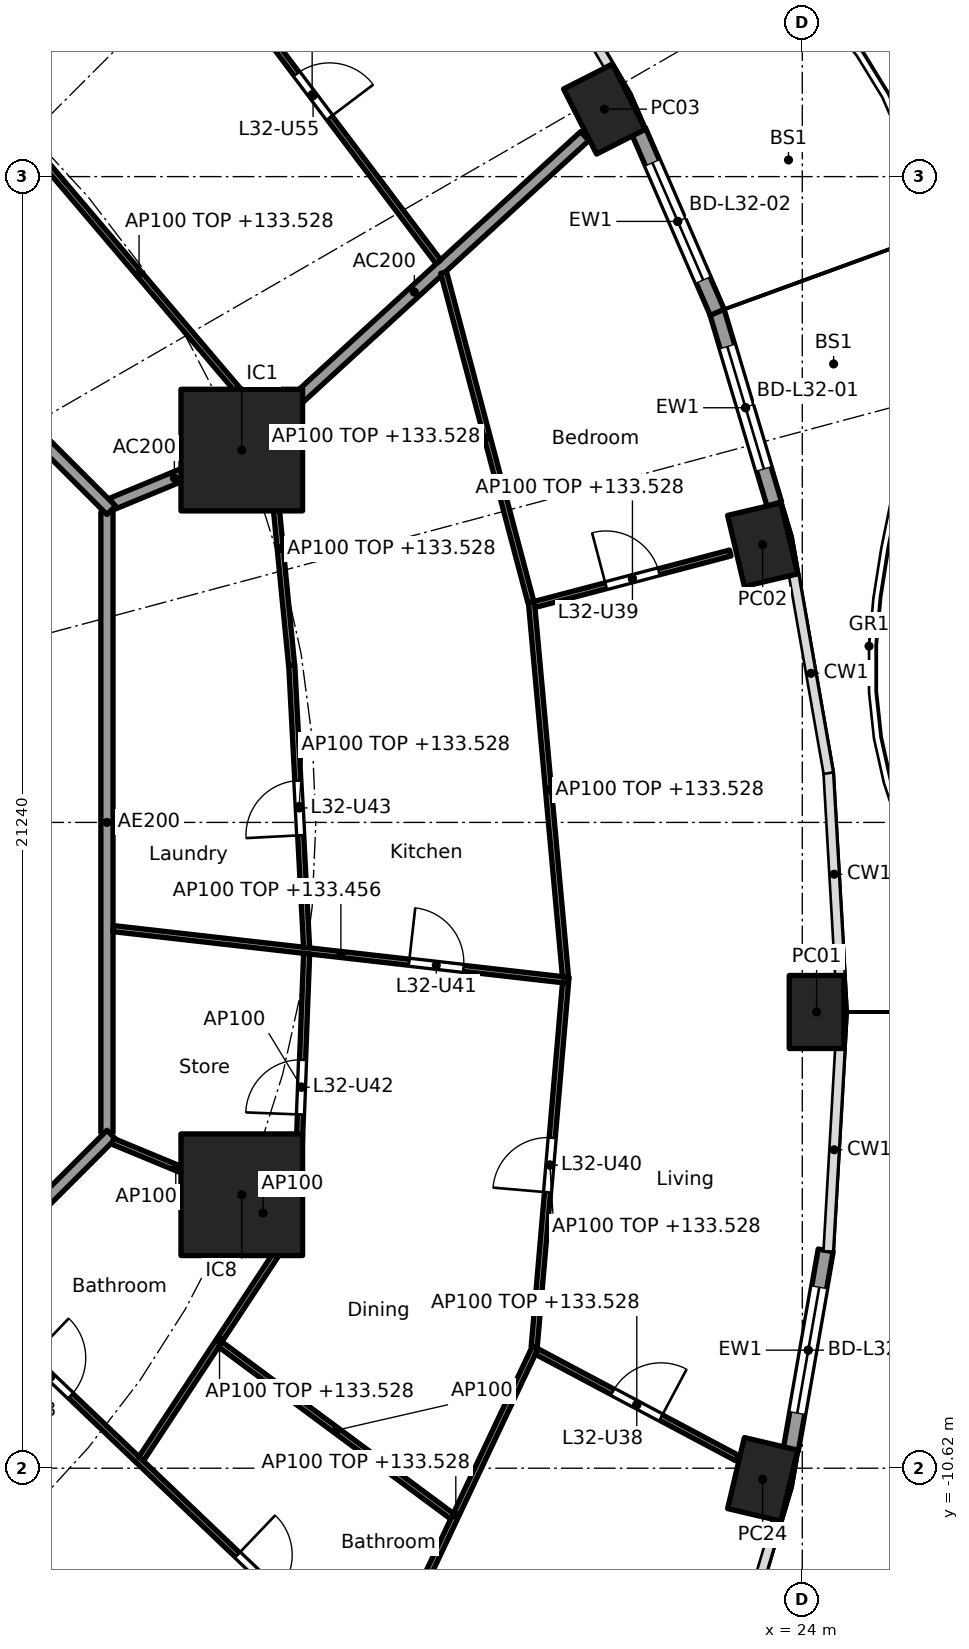
"""IFC4 building model, lengths in metres.
Left out: names, types, materials, properties, quantities, classifications, styles, units other than length and angle.
Written with IfcOpenShell. Run it as: python <this file> out.ifc"""

import sys

from ifc_helpers import new_model, si_unit, direction, frame, frame_2d, origin, origin_2d, place, context, subcontext, project, spatial, rectangle, hollow_rectangle, extrude, element, fill, save


model = new_model("IFC4")
c1 = context("Model", 3, precision=1e-05, world=origin(), true_north=direction((0.0, 1.0)))
c2 = subcontext(c1, "Body", "Model", "MODEL_VIEW")
j1 = project(units=[si_unit("LENGTHUNIT", "METRE"), si_unit("PLANEANGLEUNIT", "RADIAN")], contexts=[c1])
p1 = place(None, origin())
s1 = spatial("IfcSite", under=j1, at=p1, CompositionType="ELEMENT")
p2 = place(p1, origin())
s2 = spatial("IfcBuilding", under=s1, at=p2, CompositionType="ELEMENT")
p3 = place(p2, frame((0.0, 0.0, 130.7)))
s3 = spatial("IfcBuildingStorey", under=s2, at=p3, CompositionType="ELEMENT", Elevation=130.7)
for number, where, z_axis, x_axis in (
    (1, (24.235, -3.118, 0.0), (0.0, 0.0, 1.0), (0.0, 1.0, 0.0)),
    (2, (23.348, 4.568, 0.0), (0.0, 0.0, 1.0), (-0.229, 0.973, 0.0)),
    (3, (20.747, 11.73, 0.0), (0.0, 0.0, 1.0), (-0.452, 0.892, 0.0)),
    (4, (23.348, -10.803, 0.0), (0.0, 0.0, 1.0), (0.229, 0.973, 0.0)),
):
    element("IfcColumn", number, at=place(p3, frame(where, z_axis=z_axis, x_axis=x_axis)), inside=s3, PredefinedType="COLUMN", context=c2, shape_type="SweptSolid", body=[
        extrude(hollow_rectangle(XDim=1.2, YDim=0.9, WallThickness=0.04, at=origin_2d()), origin(), (0.0, 0.0, 1.0), 3.7),
    ])
for number, where, z_axis, x_axis in (
    (5, (14.782, 6.123, 0.0), (0.0, 0.0, 1.0), (1.0, 0.0, 0.0)),
    (6, (14.782, -6.123, 0.0), (0.0, 0.0, 1.0), (1.0, 0.0, 0.0)),
):
    element("IfcColumn", number, at=place(p3, frame(where, z_axis=z_axis, x_axis=x_axis)), inside=s3, PredefinedType="COLUMN", context=c2, shape_type="SweptSolid", body=[
        extrude(rectangle(XDim=2.0, YDim=2.0, at=origin_2d()), origin(), (0.0, 0.0, 1.0), 3.7),
    ])
p4 = place(p3, frame((22.595, 8.402, 0.0), z_axis=(0.0, 0.0, 1.0), x_axis=(0.285842038783, -0.958276749621, 0.0)))
e7 = element("IfcWall", 7, at=p4, inside=s3, PredefinedType="SOLIDWALL", context=c2, shape_type="SweptSolid", body=[
    extrude(rectangle(XDim=3.303, YDim=0.25, at=frame_2d((1.651, 0.0))), origin(), (0.0, 0.0, 1.0), 3.44),
])
p5 = place(p4, frame((0.602, 0.0, 0.0)))
e8 = element("IfcOpeningElement", 8, at=p5, cuts=e7, PredefinedType="OPENING", context=c2, shape_type="SweptSolid", body=[
    extrude(rectangle(XDim=2.1, YDim=2.4, at=frame_2d((1.05, 1.2))), frame((0.0, 0.135, 0.0), z_axis=(0.0, -1.0, 0.0), x_axis=(1.0, 0.0, 0.0)), (0.0, 0.0, 1.0), 0.27),
])
p6 = place(p3, frame((21.304, 11.38, 0.0), z_axis=(0.0, 0.0, 1.0), x_axis=(0.397575919276, -0.917569282622, 0.0)))
e9 = element("IfcWall", 9, at=p6, inside=s3, PredefinedType="SOLIDWALL", context=c2, shape_type="SweptSolid", body=[
    extrude(rectangle(XDim=3.261, YDim=0.25, at=frame_2d((1.63, 0.0))), origin(), (0.0, 0.0, 1.0), 3.44),
])
p7 = place(p6, frame((0.58, 0.0, 0.0)))
e10 = element("IfcOpeningElement", 10, at=p7, cuts=e9, PredefinedType="OPENING", context=c2, shape_type="SweptSolid", body=[
    extrude(rectangle(XDim=2.1, YDim=2.4, at=frame_2d((1.05, 1.2))), frame((0.0, 0.135, 0.0), z_axis=(0.0, -1.0, 0.0), x_axis=(1.0, 0.0, 0.0)), (0.0, 0.0, 1.0), 0.27),
])
p8 = place(p3, frame((24.385, -7.037, 0.0), z_axis=(0.0, 0.0, 1.0), x_axis=(-0.172163521006, -0.985068384446, 0.0)))
e11 = element("IfcWall", 11, at=p8, inside=s3, PredefinedType="SOLIDWALL", context=c2, shape_type="SweptSolid", body=[
    extrude(rectangle(XDim=3.333, YDim=0.25, at=frame_2d((1.666, 0.0))), origin(), (0.0, 0.0, 1.0), 3.44),
])
p9 = place(p8, frame((0.616, 0.0, 0.0)))
e12 = element("IfcOpeningElement", 12, at=p9, cuts=e11, PredefinedType="OPENING", context=c2, shape_type="SweptSolid", body=[
    extrude(rectangle(XDim=2.1, YDim=2.4, at=frame_2d((1.05, 1.2))), frame((0.0, 0.135, 0.0), z_axis=(0.0, -1.0, 0.0), x_axis=(1.0, 0.0, 0.0)), (0.0, 0.0, 1.0), 0.27),
])
p10 = place(p3, frame((12.657, 5.243, 0.0), z_axis=(0.0, 0.0, 1.0), x_axis=(0.923876145736, 0.382691608661, 0.0)))
e13 = element("IfcWall", 13, at=p10, inside=s3, PredefinedType="PARTITIONING", context=c2, shape_type="SweptSolid", body=[
    extrude(rectangle(XDim=2.2, YDim=0.2, at=frame_2d((1.1, 0.0))), origin(), (0.0, 0.0, 1.0), 3.44),
])
p11 = place(p3, frame((14.819, 6.157, 0.0), z_axis=(0.0, 0.0, 1.0), x_axis=(0.737608883396, 0.675228209671, 0.0)))
e14 = element("IfcWall", 14, at=p11, inside=s3, PredefinedType="PARTITIONING", context=c2, shape_type="SweptSolid", body=[
    extrude(rectangle(XDim=7.596, YDim=0.2, at=frame_2d((3.798, 0.0))), origin(), (0.0, 0.0, 1.0), 3.44),
])
p12 = place(p3, frame((12.565, -5.104, 0.0), z_axis=(0.0, 0.0, 1.0), x_axis=(0.0, 1.0, 0.0)))
e15 = element("IfcWall", 15, at=p12, inside=s3, PredefinedType="PARTITIONING", context=c2, shape_type="SweptSolid", body=[
    extrude(rectangle(XDim=10.209, YDim=0.2, at=frame_2d((5.104, 0.0))), origin(), (0.0, 0.0, 1.0), 3.44),
])
p13 = place(p3, frame((12.635, 5.134, 0.0), z_axis=(0.0, 0.0, 1.0), x_axis=(-0.707106781187, 0.707106781187, 0.0)))
e16 = element("IfcWall", 16, at=p13, inside=s3, PredefinedType="PARTITIONING", context=c2, shape_type="SweptSolid", body=[
    extrude(rectangle(XDim=10.609, YDim=0.2, at=frame_2d((5.305, 0.0))), origin(), (0.0, 0.0, 1.0), 3.44),
])
p14 = place(p3, frame((5.275, -12.494, 0.0), z_axis=(0.0, 0.0, 1.0), x_axis=(0.707106781187, 0.707106781187, 0.0)))
e17 = element("IfcWall", 17, at=p14, inside=s3, PredefinedType="PARTITIONING", context=c2, shape_type="SweptSolid", body=[
    extrude(rectangle(XDim=10.409, YDim=0.2, at=frame_2d((5.205, 0.0))), origin(), (0.0, 0.0, 1.0), 3.44),
])
p15 = place(p14, frame((4.604, 0.0, 0.0)))
e18 = element("IfcOpeningElement", 18, at=p15, cuts=e17, PredefinedType="OPENING", context=c2, shape_type="SweptSolid", body=[
    extrude(rectangle(XDim=1.0, YDim=2.1, at=frame_2d((0.5, 1.05))), frame((0.0, 0.11, 0.0), z_axis=(0.0, -1.0, 0.0), x_axis=(1.0, 0.0, 0.0)), (0.0, 0.0, 1.0), 0.22),
])
p16 = place(p3, frame((12.664, -1.746, 0.0), z_axis=(0.0, 0.0, 1.0), x_axis=(0.993605172276, -0.112910414164, 0.0)))
e19 = element("IfcWall", 19, at=p16, inside=s3, PredefinedType="PARTITIONING", context=c2, shape_type="SweptSolid", body=[
    extrude(rectangle(XDim=7.544, YDim=0.1, at=frame_2d((3.772, 0.0))), origin(), (0.0, 0.0, 1.0), 2.756),
])
p17 = place(p16, frame((4.901, 0.0, 0.0)))
e20 = element("IfcOpeningElement", 20, at=p17, cuts=e19, PredefinedType="OPENING", context=c2, shape_type="SweptSolid", body=[
    extrude(rectangle(XDim=0.9, YDim=2.1, at=frame_2d((0.45, 1.05))), frame((0.0, 0.06, 0.0), z_axis=(0.0, -1.0, 0.0), x_axis=(1.0, 0.0, 0.0)), (0.0, 0.0, 1.0), 0.12),
])
p18 = place(p3, frame((15.848, -2.058, 0.0), z_axis=(0.0, 0.0, 1.0), x_axis=(-0.052509224895, 0.998620439056, 0.0)))
e21 = element("IfcWall", 21, at=p18, inside=s3, PredefinedType="PARTITIONING", context=c2, shape_type="SweptSolid", body=[
    extrude(rectangle(XDim=4.649, YDim=0.1, at=frame_2d((2.325, 0.0))), origin(), (0.0, 0.0, 1.0), 2.828),
])
p19 = place(p18, frame((1.85, 0.0, 0.0)))
e22 = element("IfcOpeningElement", 22, at=p19, cuts=e21, PredefinedType="OPENING", context=c2, shape_type="SweptSolid", body=[
    extrude(rectangle(XDim=0.9, YDim=2.1, at=frame_2d((0.45, 1.05))), frame((0.0, 0.06, 0.0), z_axis=(0.0, -1.0, 0.0), x_axis=(1.0, 0.0, 0.0)), (0.0, 0.0, 1.0), 0.12),
])
p20 = place(p3, frame((15.849, -2.158, 0.0), z_axis=(0.0, 0.0, 1.0), x_axis=(-0.038390448414, -0.999262815014, 0.0)))
e23 = element("IfcWall", 23, at=p20, inside=s3, PredefinedType="PARTITIONING", context=c2, shape_type="SweptSolid", body=[
    extrude(rectangle(XDim=4.394, YDim=0.1, at=frame_2d((2.197, 0.0))), origin(), (0.0, 0.0, 1.0), 3.44),
])
p21 = place(p20, frame((1.747, 0.0, 0.0)))
e24 = element("IfcOpeningElement", 24, at=p21, cuts=e23, PredefinedType="OPENING", context=c2, shape_type="SweptSolid", body=[
    extrude(rectangle(XDim=0.9, YDim=2.1, at=frame_2d((0.45, 1.05))), frame((0.0, 0.06, 0.0), z_axis=(0.0, -1.0, 0.0), x_axis=(1.0, 0.0, 0.0)), (0.0, 0.0, 1.0), 0.12),
])
p22 = place(p3, frame((20.106, -2.542, 0.0), z_axis=(0.0, 0.0, 1.0), x_axis=(-0.090567755363, 0.995890296011, 0.0)))
e25 = element("IfcWall", 25, at=p22, inside=s3, PredefinedType="PARTITIONING", context=c2, shape_type="SweptSolid", body=[
    extrude(rectangle(XDim=6.189, YDim=0.1, at=frame_2d((3.095, 0.0))), origin(), (0.0, 0.0, 1.0), 2.828),
])
p23 = place(p3, frame((20.106, -2.642, 0.0), z_axis=(0.0, 0.0, 1.0), x_axis=(-0.085672025822, -0.996323393277, 0.0)))
e26 = element("IfcWall", 26, at=p23, inside=s3, PredefinedType="PARTITIONING", context=c2, shape_type="SweptSolid", body=[
    extrude(rectangle(XDim=6.007, YDim=0.1, at=frame_2d((3.003, 0.0))), origin(), (0.0, 0.0, 1.0), 2.828),
])
p24 = place(p23, frame((2.554, 0.0, 0.0)))
e27 = element("IfcOpeningElement", 27, at=p24, cuts=e26, PredefinedType="OPENING", context=c2, shape_type="SweptSolid", body=[
    extrude(rectangle(XDim=0.9, YDim=2.1, at=frame_2d((0.45, 1.05))), frame((0.0, 0.06, 0.0), z_axis=(0.0, -1.0, 0.0), x_axis=(1.0, 0.0, 0.0)), (0.0, 0.0, 1.0), 0.12),
])
p25 = place(p3, frame((15.602, 2.584, 0.0), z_axis=(0.0, 0.0, 1.0), x_axis=(-0.097196343206, 0.995265226393, 0.0)))
e28 = element("IfcWall", 28, at=p25, inside=s3, PredefinedType="PARTITIONING", context=c2, shape_type="SweptSolid", body=[
    extrude(rectangle(XDim=3.856, YDim=0.1, at=frame_2d((1.928, 0.0))), origin(), (0.0, 0.0, 1.0), 2.828),
])
p26 = place(p3, frame((19.598, 3.584, 0.0), z_axis=(0.0, 0.0, 1.0), x_axis=(0.967108750962, 0.254363251695, 0.0)))
e29 = element("IfcWall", 29, at=p26, inside=s3, PredefinedType="PARTITIONING", context=c2, shape_type="SweptSolid", body=[
    extrude(rectangle(XDim=3.327, YDim=0.1, at=frame_2d((1.663, 0.0))), origin(), (0.0, 0.0, 1.0), 2.828),
])
p27 = place(p26, frame((1.213, 0.0, 0.0)))
e30 = element("IfcOpeningElement", 30, at=p27, cuts=e29, PredefinedType="OPENING", context=c2, shape_type="SweptSolid", body=[
    extrude(rectangle(XDim=0.9, YDim=2.1, at=frame_2d((0.45, 1.05))), frame((0.0, 0.06, 0.0), z_axis=(0.0, -1.0, 0.0), x_axis=(1.0, 0.0, 0.0)), (0.0, 0.0, 1.0), 0.12),
])
p28 = place(p3, frame((19.537, 3.62, 0.0), z_axis=(0.0, 0.0, 1.0), x_axis=(-0.255909310473, 0.966700793841, 0.0)))
e31 = element("IfcWall", 31, at=p28, inside=s3, PredefinedType="PARTITIONING", context=c2, shape_type="SweptSolid", body=[
    extrude(rectangle(XDim=5.609, YDim=0.1, at=frame_2d((2.804, 0.0))), origin(), (0.0, 0.0, 1.0), 2.828),
])
p29 = place(p3, frame((15.153, 6.597, 0.0), z_axis=(0.0, 0.0, 1.0), x_axis=(-0.647372160855, 0.762174051874, 0.0)))
e32 = element("IfcWall", 32, at=p29, inside=s3, PredefinedType="PARTITIONING", context=c2, shape_type="SweptSolid", body=[
    extrude(rectangle(XDim=6.363, YDim=0.1, at=frame_2d((3.181, 0.0))), origin(), (0.0, 0.0, 1.0), 2.828),
])
p30 = place(p3, frame((18.016, 9.218, 0.0), z_axis=(0.0, 0.0, 1.0), x_axis=(-0.602411163107, 0.798185937338, 0.0)))
e33 = element("IfcWall", 33, at=p30, inside=s3, PredefinedType="PARTITIONING", context=c2, shape_type="SweptSolid", body=[
    extrude(rectangle(XDim=6.894, YDim=0.1, at=frame_2d((3.447, 0.0))), origin(), (0.0, 0.0, 1.0), 2.828),
])
p31 = place(p30, frame((2.972, 0.0, 0.0)))
e34 = element("IfcOpeningElement", 34, at=p31, cuts=e33, PredefinedType="OPENING", context=c2, shape_type="SweptSolid", body=[
    extrude(rectangle(XDim=0.9, YDim=2.1, at=frame_2d((0.45, 1.05))), frame((0.0, 0.06, 0.0), z_axis=(0.0, -1.0, 0.0), x_axis=(1.0, 0.0, 0.0)), (0.0, 0.0, 1.0), 0.12),
])
p32 = place(p3, frame((7.712, -10.195, 0.0), z_axis=(0.0, 0.0, 1.0), x_axis=(0.543868615753, -0.839170381269, 0.0)))
e35 = element("IfcWall", 35, at=p32, inside=s3, PredefinedType="PARTITIONING", context=c2, shape_type="SweptSolid", body=[
    extrude(rectangle(XDim=10.558, YDim=0.1, at=frame_2d((5.279, 0.0))), origin(), (0.0, 0.0, 1.0), 2.756),
])
p33 = place(p32, frame((1.81, 0.0, 0.0)))
e36 = element("IfcOpeningElement", 36, at=p33, cuts=e35, PredefinedType="OPENING", context=c2, shape_type="SweptSolid", body=[
    extrude(rectangle(XDim=0.9, YDim=2.1, at=frame_2d((0.45, 1.05))), frame((0.0, 0.06, 0.0), z_axis=(0.0, -1.0, 0.0), x_axis=(1.0, 0.0, 0.0)), (0.0, 0.0, 1.0), 0.12),
])
p34 = place(p32, frame((7.064, 0.0, 0.0)))
e37 = element("IfcOpeningElement", 37, at=p34, cuts=e35, PredefinedType="OPENING", context=c2, shape_type="SweptSolid", body=[
    extrude(rectangle(XDim=0.9, YDim=2.1, at=frame_2d((0.45, 1.05))), frame((0.0, 0.06, 0.0), z_axis=(0.0, -1.0, 0.0), x_axis=(1.0, 0.0, 0.0)), (0.0, 0.0, 1.0), 0.12),
])
p35 = place(p3, frame((10.184, -7.727, 0.0), z_axis=(0.0, 0.0, 1.0), x_axis=(0.723635100101, -0.690182759783, 0.0)))
e38 = element("IfcWall", 38, at=p35, inside=s3, PredefinedType="PARTITIONING", context=c2, shape_type="SweptSolid", body=[
    extrude(rectangle(XDim=14.173, YDim=0.1, at=frame_2d((7.086, 0.0))), origin(), (0.0, 0.0, 1.0), 2.756),
])
p36 = place(p35, frame((1.565, 0.0, 0.0)))
e39 = element("IfcOpeningElement", 39, at=p36, cuts=e38, PredefinedType="OPENING", context=c2, shape_type="SweptSolid", body=[
    extrude(rectangle(XDim=0.9, YDim=2.1, at=frame_2d((0.45, 1.05))), frame((0.0, 0.06, 0.0), z_axis=(0.0, -1.0, 0.0), x_axis=(1.0, 0.0, 0.0)), (0.0, 0.0, 1.0), 0.12),
])
p37 = place(p35, frame((6.257, 0.0, 0.0)))
e40 = element("IfcOpeningElement", 40, at=p37, cuts=e38, PredefinedType="OPENING", context=c2, shape_type="SweptSolid", body=[
    extrude(rectangle(XDim=0.9, YDim=2.1, at=frame_2d((0.45, 1.05))), frame((0.0, 0.06, 0.0), z_axis=(0.0, -1.0, 0.0), x_axis=(1.0, 0.0, 0.0)), (0.0, 0.0, 1.0), 0.12),
])
p38 = place(p35, frame((11.328, 0.0, 0.0)))
e41 = element("IfcOpeningElement", 41, at=p38, cuts=e38, PredefinedType="OPENING", context=c2, shape_type="SweptSolid", body=[
    extrude(rectangle(XDim=0.9, YDim=2.1, at=frame_2d((0.45, 1.05))), frame((0.0, 0.06, 0.0), z_axis=(0.0, -1.0, 0.0), x_axis=(1.0, 0.0, 0.0)), (0.0, 0.0, 1.0), 0.12),
])
p39 = place(p3, frame((13.127, -10.467, 0.0), z_axis=(0.0, 0.0, 1.0), x_axis=(0.550614843759, 0.834759422727, 0.0)))
e42 = element("IfcWall", 42, at=p39, inside=s3, PredefinedType="PARTITIONING", context=c2, shape_type="SweptSolid", body=[
    extrude(rectangle(XDim=4.683, YDim=0.1, at=frame_2d((2.341, 0.0))), origin(), (0.0, 0.0, 1.0), 2.828),
])
p40 = place(p3, frame((16.995, -14.158, 0.0), z_axis=(0.0, 0.0, 1.0), x_axis=(0.427456178439, 0.904036069808, 0.0)))
e43 = element("IfcWall", 43, at=p40, inside=s3, PredefinedType="PARTITIONING", context=c2, shape_type="SweptSolid", body=[
    extrude(rectangle(XDim=6.113, YDim=0.1, at=frame_2d((3.057, 0.0))), origin(), (0.0, 0.0, 1.0), 2.828),
])
p41 = place(p3, frame((14.429, -8.583, 0.0), z_axis=(0.0, 0.0, 1.0), x_axis=(0.803162355549, -0.595760212358, 0.0)))
e44 = element("IfcWall", 44, at=p41, inside=s3, PredefinedType="PARTITIONING", context=c2, shape_type="SweptSolid", body=[
    extrude(rectangle(XDim=4.745, YDim=0.1, at=frame_2d((2.373, 0.0))), origin(), (0.0, 0.0, 1.0), 3.44),
])
p42 = place(p3, frame((12.657, -5.243, 0.0), z_axis=(0.0, 0.0, 1.0), x_axis=(0.923864733477, -0.382719158442, 0.0)))
e45 = element("IfcWall", 45, at=p42, inside=s3, PredefinedType="PARTITIONING", context=c2, shape_type="SweptSolid", body=[
    extrude(rectangle(XDim=2.25, YDim=0.1, at=frame_2d((1.125, 0.0))), origin(), (0.0, 0.0, 1.0), 3.44),
])
p43 = place(p3, frame((19.631, -8.7, 0.0), z_axis=(0.0, 0.0, 1.0), x_axis=(0.883011478612, -0.469351391433, 0.0)))
e46 = element("IfcWall", 46, at=p43, inside=s3, PredefinedType="PARTITIONING", context=c2, shape_type="SweptSolid", body=[
    extrude(rectangle(XDim=3.731, YDim=0.1, at=frame_2d((1.865, 0.0))), origin(), (0.0, 0.0, 1.0), 2.828),
])
p44 = place(p43, frame((1.415, 0.0, 0.0)))
e47 = element("IfcOpeningElement", 47, at=p44, cuts=e46, PredefinedType="OPENING", context=c2, shape_type="SweptSolid", body=[
    extrude(rectangle(XDim=0.9, YDim=2.1, at=frame_2d((0.45, 1.05))), frame((0.0, 0.06, 0.0), z_axis=(0.0, -1.0, 0.0), x_axis=(1.0, 0.0, 0.0)), (0.0, 0.0, 1.0), 0.12),
])
p45 = place(p3, frame((14.774, -6.232, 0.0), z_axis=(0.0, 0.0, 1.0), x_axis=(0.883135211276, -0.46911853364, 0.0)))
e48 = element("IfcWall", 48, at=p45, inside=s3, PredefinedType="PARTITIONING", context=c2, shape_type="SweptSolid", body=[
    extrude(rectangle(XDim=0.811, YDim=0.1, at=frame_2d((0.405, 0.0))), origin(), (0.0, 0.0, 1.0), 3.44),
])
p46 = place(p5, origin())
e49 = element("IfcDoor", 49, at=p46, inside=s3, OperationType="SLIDING_TO_LEFT", PredefinedType="DOOR", context=c2, shape_type="SweptSolid", body=[
    extrude(rectangle(XDim=2.1, YDim=2.4, at=frame_2d((1.05, 1.2))), frame((0.0, 0.025, 0.0), z_axis=(0.0, -1.0, 0.0), x_axis=(1.0, 0.0, 0.0)), (0.0, 0.0, 1.0), 0.05),
])
fill(e8, e49)
p47 = place(p7, origin())
e50 = element("IfcDoor", 50, at=p47, inside=s3, OperationType="SLIDING_TO_LEFT", PredefinedType="DOOR", context=c2, shape_type="SweptSolid", body=[
    extrude(rectangle(XDim=2.1, YDim=2.4, at=frame_2d((1.05, 1.2))), frame((0.0, 0.025, 0.0), z_axis=(0.0, -1.0, 0.0), x_axis=(1.0, 0.0, 0.0)), (0.0, 0.0, 1.0), 0.05),
])
fill(e10, e50)
p48 = place(p9, origin())
e51 = element("IfcDoor", 51, at=p48, inside=s3, OperationType="SLIDING_TO_LEFT", PredefinedType="DOOR", context=c2, shape_type="SweptSolid", body=[
    extrude(rectangle(XDim=2.1, YDim=2.4, at=frame_2d((1.05, 1.2))), frame((0.0, 0.025, 0.0), z_axis=(0.0, -1.0, 0.0), x_axis=(1.0, 0.0, 0.0)), (0.0, 0.0, 1.0), 0.05),
])
fill(e12, e51)
p49 = place(p36, origin())
e52 = element("IfcDoor", 52, at=p49, inside=s3, OperationType="SINGLE_SWING_LEFT", PredefinedType="DOOR", context=c2, shape_type="SweptSolid", body=[
    extrude(rectangle(XDim=0.9, YDim=2.1, at=frame_2d((0.45, 1.05))), frame((0.0, 0.025, 0.0), z_axis=(0.0, -1.0, 0.0), x_axis=(1.0, 0.0, 0.0)), (0.0, 0.0, 1.0), 0.05),
])
fill(e39, e52)
p50 = place(p37, origin())
e53 = element("IfcDoor", 53, at=p50, inside=s3, OperationType="SINGLE_SWING_LEFT", PredefinedType="DOOR", context=c2, shape_type="SweptSolid", body=[
    extrude(rectangle(XDim=0.9, YDim=2.1, at=frame_2d((0.45, 1.05))), frame((0.0, 0.025, 0.0), z_axis=(0.0, -1.0, 0.0), x_axis=(1.0, 0.0, 0.0)), (0.0, 0.0, 1.0), 0.05),
])
fill(e40, e53)
p51 = place(p44, origin())
e54 = element("IfcDoor", 54, at=p51, inside=s3, OperationType="SINGLE_SWING_RIGHT", PredefinedType="DOOR", context=c2, shape_type="SweptSolid", body=[
    extrude(rectangle(XDim=0.9, YDim=2.1, at=frame_2d((0.45, 1.05))), frame((0.0, 0.025, 0.0), z_axis=(0.0, -1.0, 0.0), x_axis=(1.0, 0.0, 0.0)), (0.0, 0.0, 1.0), 0.05),
])
fill(e47, e54)
p52 = place(p27, origin())
e55 = element("IfcDoor", 55, at=p52, inside=s3, OperationType="SINGLE_SWING_LEFT", PredefinedType="DOOR", context=c2, shape_type="SweptSolid", body=[
    extrude(rectangle(XDim=0.9, YDim=2.1, at=frame_2d((0.45, 1.05))), frame((0.0, 0.025, 0.0), z_axis=(0.0, -1.0, 0.0), x_axis=(1.0, 0.0, 0.0)), (0.0, 0.0, 1.0), 0.05),
])
fill(e30, e55)
p53 = place(p24, frame((0.9, 0.0, 0.0), x_axis=(-1.0, 0.0, 0.0)))
e56 = element("IfcDoor", 56, at=p53, inside=s3, OperationType="SINGLE_SWING_LEFT", PredefinedType="DOOR", context=c2, shape_type="SweptSolid", body=[
    extrude(rectangle(XDim=0.9, YDim=2.1, at=frame_2d((0.45, 1.05))), frame((0.0, 0.025, 0.0), z_axis=(0.0, -1.0, 0.0), x_axis=(1.0, 0.0, 0.0)), (0.0, 0.0, 1.0), 0.05),
])
fill(e27, e56)
p54 = place(p17, origin())
e57 = element("IfcDoor", 57, at=p54, inside=s3, OperationType="SINGLE_SWING_LEFT", PredefinedType="DOOR", context=c2, shape_type="SweptSolid", body=[
    extrude(rectangle(XDim=0.9, YDim=2.1, at=frame_2d((0.45, 1.05))), frame((0.0, 0.025, 0.0), z_axis=(0.0, -1.0, 0.0), x_axis=(1.0, 0.0, 0.0)), (0.0, 0.0, 1.0), 0.05),
])
fill(e20, e57)
p55 = place(p21, frame((0.9, 0.0, 0.0), x_axis=(-1.0, 0.0, 0.0)))
e58 = element("IfcDoor", 58, at=p55, inside=s3, OperationType="SINGLE_SWING_LEFT", PredefinedType="DOOR", context=c2, shape_type="SweptSolid", body=[
    extrude(rectangle(XDim=0.9, YDim=2.1, at=frame_2d((0.45, 1.05))), frame((0.0, 0.025, 0.0), z_axis=(0.0, -1.0, 0.0), x_axis=(1.0, 0.0, 0.0)), (0.0, 0.0, 1.0), 0.05),
])
fill(e24, e58)
p56 = place(p19, origin())
e59 = element("IfcDoor", 59, at=p56, inside=s3, OperationType="SINGLE_SWING_LEFT", PredefinedType="DOOR", context=c2, shape_type="SweptSolid", body=[
    extrude(rectangle(XDim=0.9, YDim=2.1, at=frame_2d((0.45, 1.05))), frame((0.0, 0.025, 0.0), z_axis=(0.0, -1.0, 0.0), x_axis=(1.0, 0.0, 0.0)), (0.0, 0.0, 1.0), 0.05),
])
fill(e22, e59)
p57 = place(p31, frame((0.9, 0.0, 0.0), x_axis=(-1.0, 0.0, 0.0)))
e60 = element("IfcDoor", 60, at=p57, inside=s3, OperationType="SINGLE_SWING_RIGHT", PredefinedType="DOOR", context=c2, shape_type="SweptSolid", body=[
    extrude(rectangle(XDim=0.9, YDim=2.1, at=frame_2d((0.45, 1.05))), frame((0.0, 0.025, 0.0), z_axis=(0.0, -1.0, 0.0), x_axis=(1.0, 0.0, 0.0)), (0.0, 0.0, 1.0), 0.05),
])
fill(e34, e60)
save(model, sys.argv[1])
